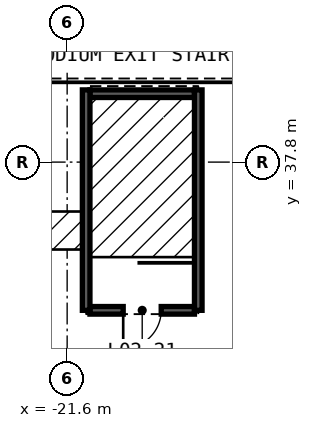
"""IFC4 building model, lengths in metres.
Left out: names, types, materials, properties, quantities, classifications, styles, units other than length and angle.
Written with IfcOpenShell. Run it as: python <this file> out.ifc"""

import sys

from ifc_helpers import new_model, si_unit, direction, frame, frame_2d, origin, place, context, subcontext, project, spatial, rectangle, extrude, element, fill, save


model = new_model("IFC4")
c1 = context("Model", 3, precision=1e-05, world=origin(), true_north=direction((0.0, 1.0)))
c2 = subcontext(c1, "Body", "Model", "MODEL_VIEW")
j1 = project(units=[si_unit("LENGTHUNIT", "METRE"), si_unit("PLANEANGLEUNIT", "RADIAN")], contexts=[c1])
p1 = place(None, origin())
s1 = spatial("IfcSite", under=j1, at=p1, CompositionType="ELEMENT")
p2 = place(p1, origin())
s2 = spatial("IfcBuilding", under=s1, at=p2, CompositionType="ELEMENT")
p3 = place(p2, frame((0.0, 0.0, 9.0)))
s3 = spatial("IfcBuildingStorey", under=s2, at=p3, CompositionType="ELEMENT", Elevation=9.0)
p4 = place(p3, frame((-21.0, 33.9, 0.0), z_axis=(0.0, 0.0, 1.0), x_axis=(1.0, 0.0, 0.0)))
e1 = element("IfcWall", 1, at=p4, inside=s3, PredefinedType="SOLIDWALL", context=c2, shape_type="SweptSolid", body=[
    extrude(rectangle(XDim=2.75, YDim=0.2, at=frame_2d((1.375, 0.0))), origin(), (0.0, 0.0, 1.0), 3.0),
])
p5 = place(p4, frame((1.875, 0.0, 0.0), z_axis=(0.0, 0.0, 1.0), x_axis=(-1.0, 0.0, 0.0)))
e2 = element("IfcOpeningElement", 2, at=p5, cuts=e1, PredefinedType="OPENING", context=c2, shape_type="SweptSolid", body=[
    extrude(rectangle(XDim=1.0, YDim=2.1, at=frame_2d((0.5, 1.05))), frame((0.0, 0.11, 0.0), z_axis=(0.0, -1.0, 0.0), x_axis=(1.0, 0.0, 0.0)), (0.0, 0.0, 1.0), 0.22),
])
p6 = place(p3, frame((-21.0, 39.6, 0.0), z_axis=(0.0, 0.0, 1.0), x_axis=(1.0, 0.0, 0.0)))
e3 = element("IfcWall", 3, at=p6, inside=s3, PredefinedType="SOLIDWALL", context=c2, shape_type="SweptSolid", body=[
    extrude(rectangle(XDim=2.75, YDim=0.2, at=frame_2d((1.375, 0.0))), origin(), (0.0, 0.0, 1.0), 3.0),
])
for number, where, z_axis, x_axis in (
    (4, (-21.1, 33.9, 0.0), (0.0, 0.0, 1.0), (0.0, 1.0, 0.0)),
    (5, (-18.15, 33.9, 0.0), (0.0, 0.0, 1.0), (0.0, 1.0, 0.0)),
):
    element("IfcWall", number, at=place(p3, frame(where, z_axis=z_axis, x_axis=x_axis)), inside=s3, PredefinedType="SOLIDWALL", context=c2, shape_type="SweptSolid", body=[
        extrude(rectangle(XDim=5.8, YDim=0.2, at=frame_2d((2.9, 0.0))), origin(), (0.0, 0.0, 1.0), 3.0),
    ])
p7 = place(p5, origin())
e6 = element("IfcDoor", 6, at=p7, inside=s3, OperationType="SINGLE_SWING_RIGHT", PredefinedType="DOOR", context=c2, shape_type="SweptSolid", body=[
    extrude(rectangle(XDim=1.0, YDim=2.1, at=frame_2d((0.5, 1.05))), frame((0.0, 0.025, 0.0), z_axis=(0.0, -1.0, 0.0), x_axis=(1.0, 0.0, 0.0)), (0.0, 0.0, 1.0), 0.05),
])
fill(e2, e6)
save(model, sys.argv[1])
